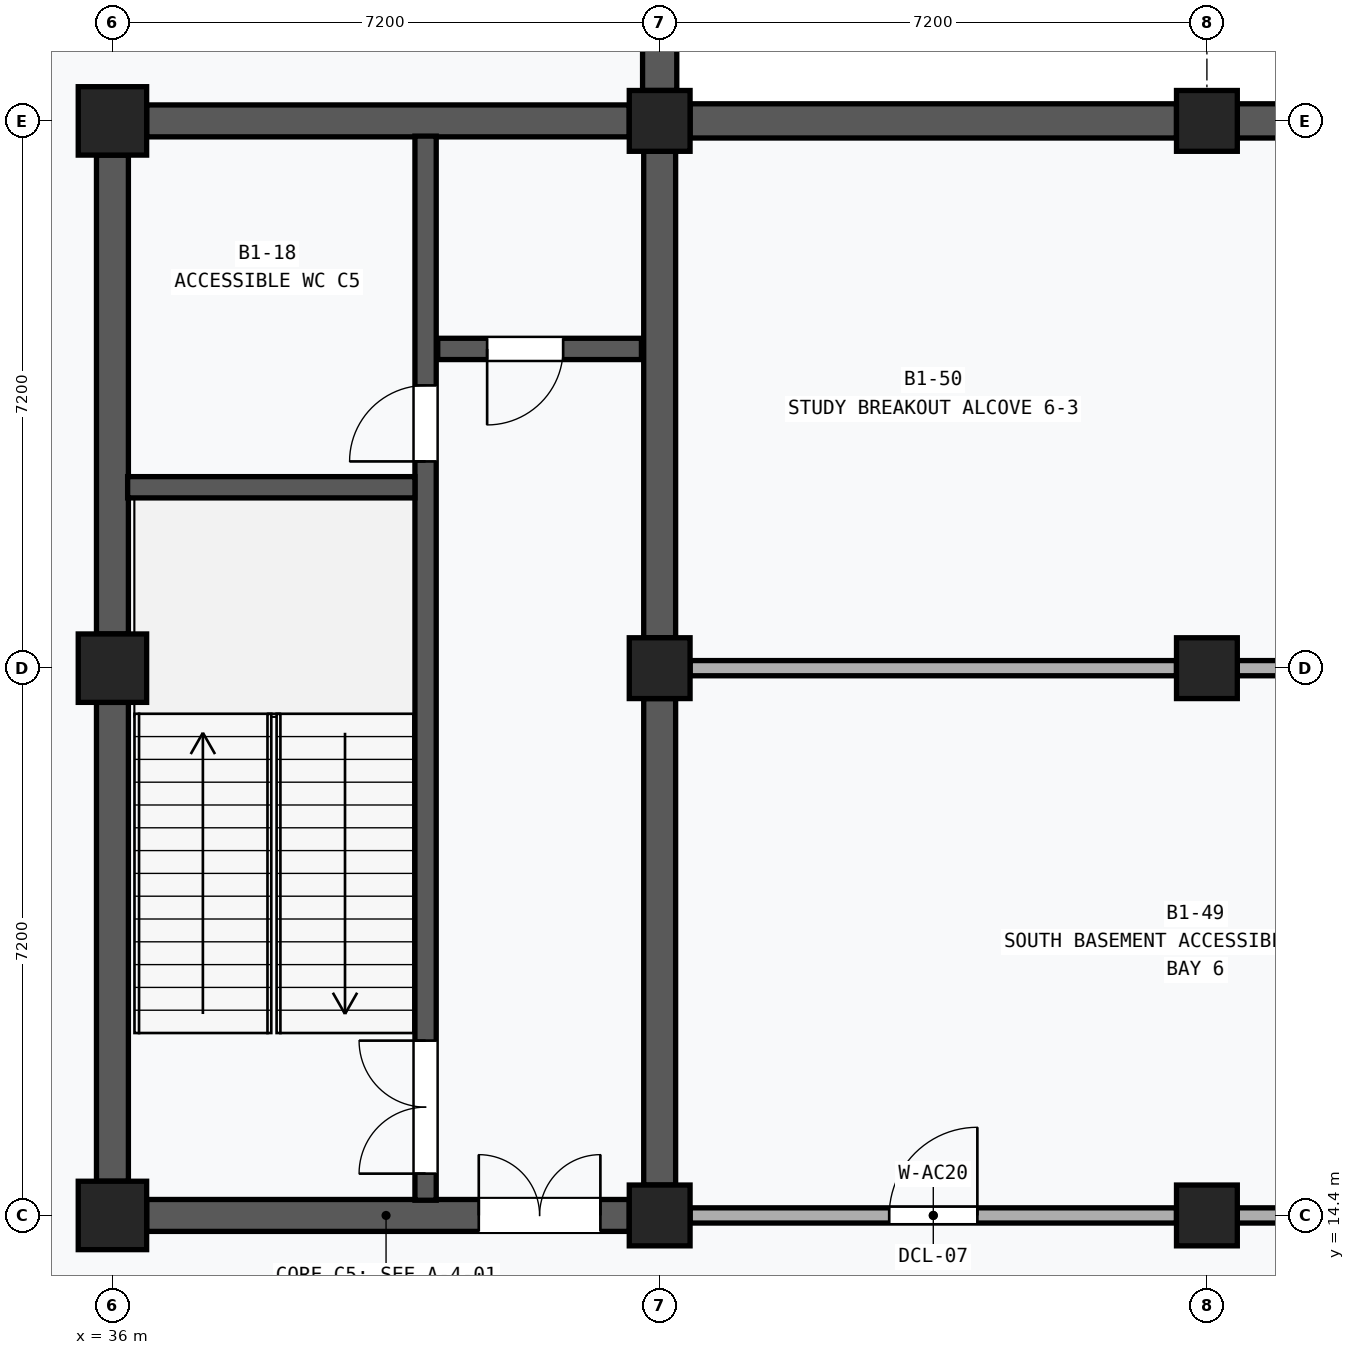
"""IFC4 building model, lengths in metres.
Left out: names, types, materials, properties, quantities, classifications, styles, units other than length and angle.
Written with IfcOpenShell. Run it as: python <this file> out.ifc"""

import sys

from ifc_helpers import new_model, si_unit, direction, frame, frame_2d, origin, origin_2d, place, context, subcontext, project, spatial, rectangle, extrude, element, fill, save


model = new_model("IFC4")
c1 = context("Model", 3, precision=1e-05, world=origin(), true_north=direction((0.0, 1.0)))
c2 = subcontext(c1, "Body", "Model", "MODEL_VIEW")
j1 = project(units=[si_unit("LENGTHUNIT", "METRE"), si_unit("PLANEANGLEUNIT", "RADIAN")], contexts=[c1])
p1 = place(None, origin())
s1 = spatial("IfcSite", under=j1, at=p1, CompositionType="ELEMENT")
p2 = place(p1, origin())
s2 = spatial("IfcBuilding", under=s1, at=p2, CompositionType="ELEMENT")
p3 = place(p2, frame((0.0, 0.0, -4.5)))
s3 = spatial("IfcBuildingStorey", under=s2, at=p3, CompositionType="ELEMENT", Elevation=-4.5)
for number, where, z_axis, x_axis in (
    (1, (36.0, 14.4, 0.0), (0.0, 0.0, 1.0), (1.0, 0.0, 0.0)),
    (2, (36.0, 21.6, 0.0), (0.0, 0.0, 1.0), (1.0, 0.0, 0.0)),
    (3, (36.0, 28.8, 0.0), (0.0, 0.0, 1.0), (1.0, 0.0, 0.0)),
):
    element("IfcColumn", number, at=place(p3, frame(where, z_axis=z_axis, x_axis=x_axis)), inside=s3, PredefinedType="COLUMN", context=c2, shape_type="SweptSolid", body=[
        extrude(rectangle(XDim=0.9, YDim=0.9, at=origin_2d()), origin(), (0.0, 0.0, 1.0), 4.5),
    ])
for number, where, z_axis, x_axis in (
    (4, (43.2, 14.4, 0.0), (0.0, 0.0, 1.0), (1.0, 0.0, 0.0)),
    (5, (43.2, 21.6, 0.0), (0.0, 0.0, 1.0), (1.0, 0.0, 0.0)),
    (6, (43.2, 28.8, 0.0), (0.0, 0.0, 1.0), (1.0, 0.0, 0.0)),
    (7, (50.4, 14.4, 0.0), (0.0, 0.0, 1.0), (1.0, 0.0, 0.0)),
    (8, (50.4, 21.6, 0.0), (0.0, 0.0, 1.0), (1.0, 0.0, 0.0)),
    (9, (50.4, 28.8, 0.0), (0.0, 0.0, 1.0), (1.0, 0.0, 0.0)),
):
    element("IfcColumn", number, at=place(p3, frame(where, z_axis=z_axis, x_axis=x_axis)), inside=s3, PredefinedType="COLUMN", context=c2, shape_type="SweptSolid", body=[
        extrude(rectangle(XDim=0.8, YDim=0.8, at=origin_2d()), origin(), (0.0, 0.0, 1.0), 4.5),
    ])
p4 = place(p3, frame((43.2, 29.2, 0.0), z_axis=(0.0, 0.0, 1.0), x_axis=(0.0, 1.0, 0.0)))
e10 = element("IfcWall", 10, at=p4, inside=s3, PredefinedType="SOLIDWALL", context=c2, shape_type="SweptSolid", body=[
    extrude(rectangle(XDim=6.4, YDim=0.45, at=frame_2d((3.2, 0.0))), origin(), (0.0, 0.0, 1.0), 3.57),
])
for number, where, z_axis, x_axis in (
    (11, (43.6, 28.8, 0.0), (0.0, 0.0, 1.0), (1.0, 0.0, 0.0)),
    (12, (50.8, 28.8, 0.0), (0.0, 0.0, 1.0), (1.0, 0.0, 0.0)),
):
    element("IfcWall", number, at=place(p3, frame(where, z_axis=z_axis, x_axis=x_axis)), inside=s3, PredefinedType="SOLIDWALL", context=c2, shape_type="SweptSolid", body=[
        extrude(rectangle(XDim=6.4, YDim=0.45, at=frame_2d((3.2, 0.0))), origin(), (0.0, 0.0, 1.0), 3.57),
    ])
p5 = place(p3, frame((36.0, 14.85, 0.0), z_axis=(0.0, 0.0, 1.0), x_axis=(0.0, 1.0, 0.0)))
e13 = element("IfcWall", 13, at=p5, inside=s3, PredefinedType="SHEAR", context=c2, shape_type="SweptSolid", body=[
    extrude(rectangle(XDim=6.3, YDim=0.42, at=frame_2d((3.15, 0.0))), origin(), (0.0, 0.0, 1.0), 3.3),
])
p6 = place(p3, frame((36.0, 22.05, 0.0), z_axis=(0.0, 0.0, 1.0), x_axis=(0.0, 1.0, 0.0)))
e14 = element("IfcWall", 14, at=p6, inside=s3, PredefinedType="SHEAR", context=c2, shape_type="SweptSolid", body=[
    extrude(rectangle(XDim=6.3, YDim=0.42, at=frame_2d((3.15, 0.0))), origin(), (0.0, 0.0, 1.0), 3.3),
])
for number, where, z_axis, x_axis in (
    (15, (43.2, 14.8, 0.0), (0.0, 0.0, 1.0), (0.0, 1.0, 0.0)),
    (16, (43.2, 22.0, 0.0), (0.0, 0.0, 1.0), (0.0, 1.0, 0.0)),
):
    element("IfcWall", number, at=place(p3, frame(where, z_axis=z_axis, x_axis=x_axis)), inside=s3, PredefinedType="SHEAR", context=c2, shape_type="SweptSolid", body=[
        extrude(rectangle(XDim=6.4, YDim=0.42, at=frame_2d((3.2, 0.0))), origin(), (0.0, 0.0, 1.0), 3.3),
    ])
p7 = place(p3, frame((36.45, 14.4, 0.0), z_axis=(0.0, 0.0, 1.0), x_axis=(1.0, 0.0, 0.0)))
e17 = element("IfcWall", 17, at=p7, inside=s3, PredefinedType="SHEAR", context=c2, shape_type="SweptSolid", body=[
    extrude(rectangle(XDim=6.35, YDim=0.42, at=frame_2d((3.175, 0.0))), origin(), (0.0, 0.0, 1.0), 3.3),
])
p8 = place(p7, frame((4.37, 0.0, 0.0)))
e18 = element("IfcOpeningElement", 18, at=p8, cuts=e17, PredefinedType="OPENING", context=c2, shape_type="SweptSolid", body=[
    extrude(rectangle(XDim=1.6, YDim=2.2, at=frame_2d((0.8, 1.1))), frame((0.0, 0.222, 0.0), z_axis=(0.0, -1.0, 0.0), x_axis=(1.0, 0.0, 0.0)), (0.0, 0.0, 1.0), 0.444),
])
p9 = place(p3, frame((36.45, 28.8, 0.0), z_axis=(0.0, 0.0, 1.0), x_axis=(1.0, 0.0, 0.0)))
e19 = element("IfcWall", 19, at=p9, inside=s3, PredefinedType="SHEAR", context=c2, shape_type="SweptSolid", body=[
    extrude(rectangle(XDim=6.35, YDim=0.42, at=frame_2d((3.175, 0.0))), origin(), (0.0, 0.0, 1.0), 3.3),
])
p10 = place(p3, frame((40.12, 14.6, 0.0), z_axis=(0.0, 0.0, 1.0), x_axis=(0.0, 1.0, 0.0)))
e20 = element("IfcWall", 20, at=p10, inside=s3, PredefinedType="SHEAR", context=c2, shape_type="SweptSolid", body=[
    extrude(rectangle(XDim=14.0, YDim=0.28, at=frame_2d((7.0, 0.0))), origin(), (0.0, 0.0, 1.0), 4.2),
])
p11 = place(p10, frame((0.35, 0.0, 0.0)))
e21 = element("IfcOpeningElement", 21, at=p11, cuts=e20, PredefinedType="OPENING", context=c2, shape_type="SweptSolid", body=[
    extrude(rectangle(XDim=1.75, YDim=2.15, at=frame_2d((0.875, 1.075))), frame((0.0, 0.152, 0.0), z_axis=(0.0, -1.0, 0.0), x_axis=(1.0, 0.0, 0.0)), (0.0, 0.0, 1.0), 0.304),
])
p12 = place(p10, frame((9.72, 0.0, 0.0)))
e22 = element("IfcOpeningElement", 22, at=p12, cuts=e20, PredefinedType="OPENING", context=c2, shape_type="SweptSolid", body=[
    extrude(rectangle(XDim=1.0, YDim=2.15, at=frame_2d((0.5, 1.075))), frame((0.0, 0.152, 0.0), z_axis=(0.0, -1.0, 0.0), x_axis=(1.0, 0.0, 0.0)), (0.0, 0.0, 1.0), 0.304),
])
p13 = place(p3, frame((36.2, 23.98, 0.0), z_axis=(0.0, 0.0, 1.0), x_axis=(1.0, 0.0, 0.0)))
e23 = element("IfcWall", 23, at=p13, inside=s3, PredefinedType="SHEAR", context=c2, shape_type="SweptSolid", body=[
    extrude(rectangle(XDim=3.78, YDim=0.28, at=frame_2d((1.89, 0.0))), origin(), (0.0, 0.0, 1.0), 4.2),
])
p14 = place(p3, frame((40.28, 25.8, 0.0), z_axis=(0.0, 0.0, 1.0), x_axis=(1.0, 0.0, 0.0)))
e24 = element("IfcWall", 24, at=p14, inside=s3, PredefinedType="SHEAR", context=c2, shape_type="SweptSolid", body=[
    extrude(rectangle(XDim=2.68, YDim=0.28, at=frame_2d((1.34, 0.0))), origin(), (0.0, 0.0, 1.0), 4.2),
])
p15 = place(p14, frame((0.65, 0.0, 0.0)))
e25 = element("IfcOpeningElement", 25, at=p15, cuts=e24, PredefinedType="OPENING", context=c2, shape_type="SweptSolid", body=[
    extrude(rectangle(XDim=1.0, YDim=2.15, at=frame_2d((0.5, 1.075))), frame((0.0, 0.152, 0.0), z_axis=(0.0, -1.0, 0.0), x_axis=(1.0, 0.0, 0.0)), (0.0, 0.0, 1.0), 0.304),
])
p16 = place(p3, frame((43.6, 14.4, 0.0), z_axis=(0.0, 0.0, 1.0), x_axis=(1.0, 0.0, 0.0)))
e26 = element("IfcWall", 26, at=p16, inside=s3, PredefinedType="PARTITIONING", context=c2, shape_type="SweptSolid", body=[
    extrude(rectangle(XDim=6.4, YDim=0.2, at=frame_2d((3.2, 0.0))), origin(), (0.0, 0.0, 1.0), 3.3),
])
p17 = place(p16, frame((2.62, 0.0, 0.0)))
e27 = element("IfcOpeningElement", 27, at=p17, cuts=e26, PredefinedType="OPENING", context=c2, shape_type="SweptSolid", body=[
    extrude(rectangle(XDim=1.16, YDim=2.22, at=frame_2d((0.58, 1.11))), frame((0.0, 0.112, 0.0), z_axis=(0.0, -1.0, 0.0), x_axis=(1.0, 0.0, 0.0)), (0.0, 0.0, 1.0), 0.224),
])
for number, where, z_axis, x_axis in (
    (28, (43.6, 21.6, 0.0), (0.0, 0.0, 1.0), (1.0, 0.0, 0.0)),
    (29, (50.8, 14.4, 0.0), (0.0, 0.0, 1.0), (1.0, 0.0, 0.0)),
    (30, (50.8, 21.6, 0.0), (0.0, 0.0, 1.0), (1.0, 0.0, 0.0)),
):
    element("IfcWall", number, at=place(p3, frame(where, z_axis=z_axis, x_axis=x_axis)), inside=s3, PredefinedType="PARTITIONING", context=c2, shape_type="SweptSolid", body=[
        extrude(rectangle(XDim=6.4, YDim=0.2, at=frame_2d((3.2, 0.0))), origin(), (0.0, 0.0, 1.0), 3.3),
    ])
p18 = place(p8, origin())
e31 = element("IfcDoor", 31, at=p18, inside=s3, OperationType="DOUBLE_DOOR_SINGLE_SWING", PredefinedType="DOOR", context=c2, shape_type="SweptSolid", body=[
    extrude(rectangle(XDim=1.6, YDim=2.2, at=frame_2d((0.8, 1.1))), frame((0.0, 0.025, 0.0), z_axis=(0.0, -1.0, 0.0), x_axis=(1.0, 0.0, 0.0)), (0.0, 0.0, 1.0), 0.05),
])
fill(e18, e31)
p19 = place(p11, origin())
e32 = element("IfcDoor", 32, at=p19, inside=s3, OperationType="DOUBLE_DOOR_SINGLE_SWING", PredefinedType="DOOR", context=c2, shape_type="SweptSolid", body=[
    extrude(rectangle(XDim=1.75, YDim=2.15, at=frame_2d((0.875, 1.075))), frame((0.0, 0.025, 0.0), z_axis=(0.0, -1.0, 0.0), x_axis=(1.0, 0.0, 0.0)), (0.0, 0.0, 1.0), 0.05),
])
fill(e21, e32)
p20 = place(p12, origin())
e33 = element("IfcDoor", 33, at=p20, inside=s3, OperationType="SINGLE_SWING_LEFT", PredefinedType="DOOR", context=c2, shape_type="SweptSolid", body=[
    extrude(rectangle(XDim=1.0, YDim=2.15, at=frame_2d((0.5, 1.075))), frame((0.0, 0.025, 0.0), z_axis=(0.0, -1.0, 0.0), x_axis=(1.0, 0.0, 0.0)), (0.0, 0.0, 1.0), 0.05),
])
fill(e22, e33)
p21 = place(p15, frame((1.0, 0.0, 0.0), z_axis=(0.0, 0.0, 1.0), x_axis=(-1.0, 0.0, 0.0)))
e34 = element("IfcDoor", 34, at=p21, inside=s3, OperationType="SINGLE_SWING_RIGHT", PredefinedType="DOOR", context=c2, shape_type="SweptSolid", body=[
    extrude(rectangle(XDim=1.0, YDim=2.15, at=frame_2d((0.5, 1.075))), frame((0.0, 0.025, 0.0), z_axis=(0.0, -1.0, 0.0), x_axis=(1.0, 0.0, 0.0)), (0.0, 0.0, 1.0), 0.05),
])
fill(e25, e34)
p22 = place(p17, origin())
e35 = element("IfcDoor", 35, at=p22, inside=s3, OperationType="SINGLE_SWING_RIGHT", PredefinedType="DOOR", context=c2, shape_type="SweptSolid", body=[
    extrude(rectangle(XDim=1.16, YDim=2.22, at=frame_2d((0.58, 1.11))), frame((0.0, 0.025, 0.0), z_axis=(0.0, -1.0, 0.0), x_axis=(1.0, 0.0, 0.0)), (0.0, 0.0, 1.0), 0.05),
])
fill(e27, e35)
save(model, sys.argv[1])
